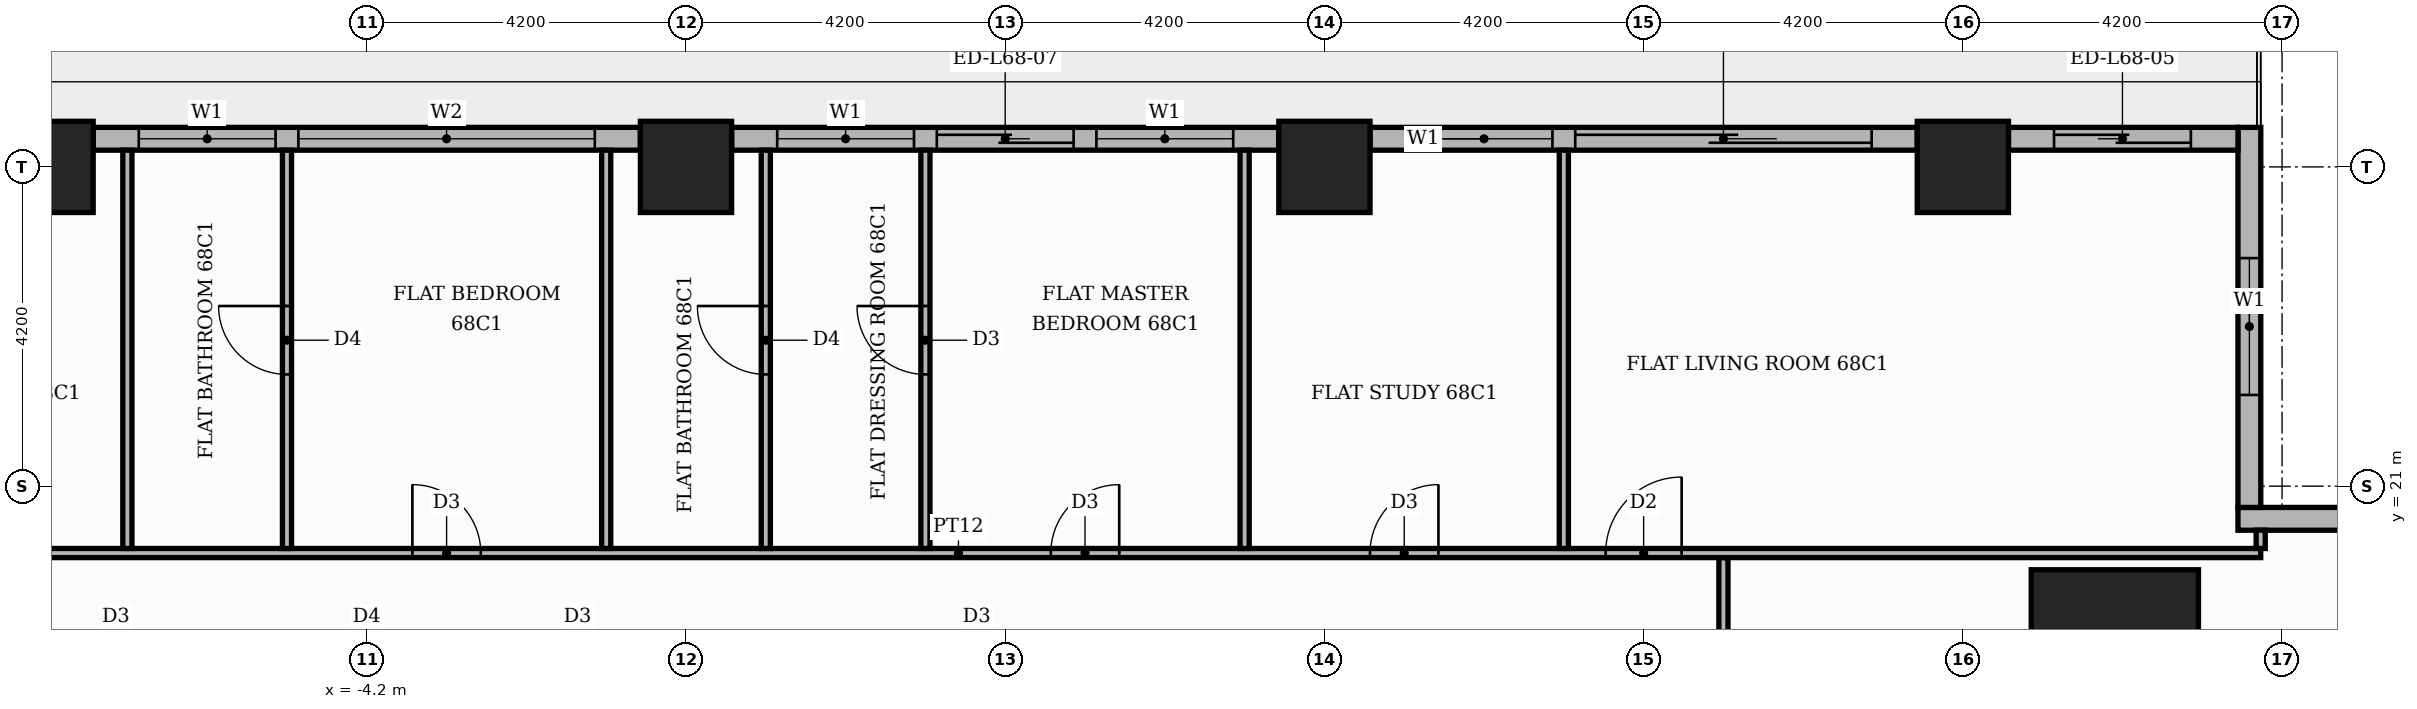
"""IFC4 building model, lengths in metres.
Left out: names, types, materials, properties, quantities, classifications, styles, units other than length and angle.
Written with IfcOpenShell. Run it as: python <this file> out.ifc"""

import sys

from ifc_helpers import new_model, si_unit, direction, frame, frame_2d, origin, origin_2d, place, context, subcontext, project, spatial, rectangle, extrude, element, fill, save


model = new_model("IFC4")
c1 = context("Model", 3, precision=1e-05, world=origin(), true_north=direction((0.0, 1.0)))
c2 = subcontext(c1, "Body", "Model", "MODEL_VIEW")
j1 = project(units=[si_unit("LENGTHUNIT", "METRE"), si_unit("PLANEANGLEUNIT", "RADIAN")], contexts=[c1])
p1 = place(None, origin())
s1 = spatial("IfcSite", under=j1, at=p1, CompositionType="ELEMENT")
p2 = place(p1, origin())
s2 = spatial("IfcBuilding", under=s1, at=p2, CompositionType="ELEMENT")
p3 = place(p2, frame((0.0, 0.0, 283.5)))
s3 = spatial("IfcBuildingStorey", under=s2, at=p3, CompositionType="ELEMENT", Elevation=283.5)
p4 = place(p3, frame((18.8, 18.8, 0.0), z_axis=(0.0, 0.0, 1.0), x_axis=(1.0, 0.0, 0.0)))
e1 = element("IfcColumn", 1, at=p4, inside=s3, PredefinedType="COLUMN", context=c2, shape_type="SweptSolid", body=[
    extrude(rectangle(XDim=2.2, YDim=2.2, at=origin_2d()), origin(), (0.0, 0.0, 1.0), 3.9),
])
for number, where, z_axis, x_axis in (
    (2, (0.0, 25.2, 0.0), (0.0, 0.0, 1.0), (1.0, 0.0, 0.0)),
    (3, (-8.4, 25.2, 0.0), (0.0, 0.0, 1.0), (1.0, 0.0, 0.0)),
    (4, (8.4, 25.2, 0.0), (0.0, 0.0, 1.0), (1.0, 0.0, 0.0)),
    (5, (16.8, 25.2, 0.0), (0.0, 0.0, 1.0), (1.0, 0.0, 0.0)),
):
    element("IfcColumn", number, at=place(p3, frame(where, z_axis=z_axis, x_axis=x_axis)), inside=s3, PredefinedType="COLUMN", context=c2, shape_type="SweptSolid", body=[
        extrude(rectangle(XDim=1.2, YDim=1.2, at=origin_2d()), origin(), (0.0, 0.0, 1.0), 3.9),
    ])
p5 = place(p3, frame((25.42, 20.57, 0.0), z_axis=(0.0, 0.0, 1.0), x_axis=(-1.0, 0.0, 0.0)))
e6 = element("IfcWall", 6, at=p5, inside=s3, PredefinedType="STANDARD", context=c2, shape_type="SweptSolid", body=[
    extrude(rectangle(XDim=5.0, YDim=0.3, at=frame_2d((2.5, 0.0))), origin(), (0.0, 0.0, 1.0), 3.4),
])
p6 = place(p5, frame((1.42, 0.0, 0.9)))
e7 = element("IfcOpeningElement", 7, at=p6, cuts=e6, PredefinedType="OPENING", context=c2, shape_type="SweptSolid", body=[
    extrude(rectangle(XDim=1.8, YDim=2.1, at=frame_2d((0.9, 1.05))), frame((0.0, 0.16, 0.0), z_axis=(0.0, -1.0, 0.0), x_axis=(1.0, 0.0, 0.0)), (0.0, 0.0, 1.0), 0.32),
])
p7 = place(p3, frame((20.57, 20.72, 0.0), z_axis=(0.0, 0.0, 1.0), x_axis=(0.0, 1.0, 0.0)))
e8 = element("IfcWall", 8, at=p7, inside=s3, PredefinedType="STANDARD", context=c2, shape_type="SweptSolid", body=[
    extrude(rectangle(XDim=5.0, YDim=0.3, at=frame_2d((2.5, 0.0))), origin(), (0.0, 0.0, 1.0), 3.4),
])
p8 = place(p7, frame((1.48, 0.0, 0.9)))
e9 = element("IfcOpeningElement", 9, at=p8, cuts=e8, PredefinedType="OPENING", context=c2, shape_type="SweptSolid", body=[
    extrude(rectangle(XDim=1.8, YDim=2.1, at=frame_2d((0.9, 1.05))), frame((0.0, 0.16, 0.0), z_axis=(0.0, -1.0, 0.0), x_axis=(1.0, 0.0, 0.0)), (0.0, 0.0, 1.0), 0.32),
])
p9 = place(p3, frame((20.42, 25.57, 0.0), z_axis=(0.0, 0.0, 1.0), x_axis=(-1.0, 0.0, 0.0)))
e10 = element("IfcWall", 10, at=p9, inside=s3, PredefinedType="STANDARD", context=c2, shape_type="SweptSolid", body=[
    extrude(rectangle(XDim=3.02, YDim=0.3, at=frame_2d((1.51, 0.0))), origin(), (0.0, 0.0, 1.0), 3.4),
])
p10 = place(p9, frame((0.62, 0.0, 0.0)))
e11 = element("IfcOpeningElement", 11, at=p10, cuts=e10, PredefinedType="OPENING", context=c2, shape_type="SweptSolid", body=[
    extrude(rectangle(XDim=1.8, YDim=2.4, at=frame_2d((0.9, 1.2))), frame((0.0, 0.16, 0.0), z_axis=(0.0, -1.0, 0.0), x_axis=(1.0, 0.0, 0.0)), (0.0, 0.0, 1.0), 0.32),
])
p11 = place(p3, frame((16.2, 25.57, 0.0), z_axis=(0.0, 0.0, 1.0), x_axis=(-1.0, 0.0, 0.0)))
e12 = element("IfcWall", 12, at=p11, inside=s3, PredefinedType="STANDARD", context=c2, shape_type="SweptSolid", body=[
    extrude(rectangle(XDim=7.2, YDim=0.3, at=frame_2d((3.6, 0.0))), origin(), (0.0, 0.0, 1.0), 3.4),
])
p12 = place(p11, frame((0.6, 0.0, 0.0)))
e13 = element("IfcOpeningElement", 13, at=p12, cuts=e12, PredefinedType="OPENING", context=c2, shape_type="SweptSolid", body=[
    extrude(rectangle(XDim=3.9, YDim=2.4, at=frame_2d((1.95, 1.2))), frame((0.0, 0.16, 0.0), z_axis=(0.0, -1.0, 0.0), x_axis=(1.0, 0.0, 0.0)), (0.0, 0.0, 1.0), 0.32),
])
p13 = place(p11, frame((4.8, 0.0, 0.9)))
e14 = element("IfcOpeningElement", 14, at=p13, cuts=e12, PredefinedType="OPENING", context=c2, shape_type="SweptSolid", body=[
    extrude(rectangle(XDim=1.8, YDim=2.1, at=frame_2d((0.9, 1.05))), frame((0.0, 0.16, 0.0), z_axis=(0.0, -1.0, 0.0), x_axis=(1.0, 0.0, 0.0)), (0.0, 0.0, 1.0), 0.32),
])
p14 = place(p3, frame((7.8, 25.57, 0.0), z_axis=(0.0, 0.0, 1.0), x_axis=(-1.0, 0.0, 0.0)))
e15 = element("IfcWall", 15, at=p14, inside=s3, PredefinedType="STANDARD", context=c2, shape_type="SweptSolid", body=[
    extrude(rectangle(XDim=7.2, YDim=0.3, at=frame_2d((3.6, 0.0))), origin(), (0.0, 0.0, 1.0), 3.4),
])
p15 = place(p14, frame((0.6, 0.0, 0.9)))
e16 = element("IfcOpeningElement", 16, at=p15, cuts=e15, PredefinedType="OPENING", context=c2, shape_type="SweptSolid", body=[
    extrude(rectangle(XDim=1.8, YDim=2.1, at=frame_2d((0.9, 1.05))), frame((0.0, 0.16, 0.0), z_axis=(0.0, -1.0, 0.0), x_axis=(1.0, 0.0, 0.0)), (0.0, 0.0, 1.0), 0.32),
])
p16 = place(p14, frame((2.7, 0.0, 0.0)))
e17 = element("IfcOpeningElement", 17, at=p16, cuts=e15, PredefinedType="OPENING", context=c2, shape_type="SweptSolid", body=[
    extrude(rectangle(XDim=1.8, YDim=2.4, at=frame_2d((0.9, 1.2))), frame((0.0, 0.16, 0.0), z_axis=(0.0, -1.0, 0.0), x_axis=(1.0, 0.0, 0.0)), (0.0, 0.0, 1.0), 0.32),
])
p17 = place(p14, frame((4.8, 0.0, 0.9)))
e18 = element("IfcOpeningElement", 18, at=p17, cuts=e15, PredefinedType="OPENING", context=c2, shape_type="SweptSolid", body=[
    extrude(rectangle(XDim=1.8, YDim=2.1, at=frame_2d((0.9, 1.05))), frame((0.0, 0.16, 0.0), z_axis=(0.0, -1.0, 0.0), x_axis=(1.0, 0.0, 0.0)), (0.0, 0.0, 1.0), 0.32),
])
p18 = place(p3, frame((-0.6, 25.57, 0.0), z_axis=(0.0, 0.0, 1.0), x_axis=(-1.0, 0.0, 0.0)))
e19 = element("IfcWall", 19, at=p18, inside=s3, PredefinedType="STANDARD", context=c2, shape_type="SweptSolid", body=[
    extrude(rectangle(XDim=7.2, YDim=0.3, at=frame_2d((3.6, 0.0))), origin(), (0.0, 0.0, 1.0), 3.4),
])
p19 = place(p18, frame((0.6, 0.0, 0.9)))
e20 = element("IfcOpeningElement", 20, at=p19, cuts=e19, PredefinedType="OPENING", context=c2, shape_type="SweptSolid", body=[
    extrude(rectangle(XDim=3.9, YDim=2.1, at=frame_2d((1.95, 1.05))), frame((0.0, 0.16, 0.0), z_axis=(0.0, -1.0, 0.0), x_axis=(1.0, 0.0, 0.0)), (0.0, 0.0, 1.0), 0.32),
])
p20 = place(p18, frame((4.8, 0.0, 0.9)))
e21 = element("IfcOpeningElement", 21, at=p20, cuts=e19, PredefinedType="OPENING", context=c2, shape_type="SweptSolid", body=[
    extrude(rectangle(XDim=1.8, YDim=2.1, at=frame_2d((0.9, 1.05))), frame((0.0, 0.16, 0.0), z_axis=(0.0, -1.0, 0.0), x_axis=(1.0, 0.0, 0.0)), (0.0, 0.0, 1.0), 0.32),
])
p21 = place(p3, frame((13.65, 13.75, 0.0), z_axis=(0.0, 0.0, 1.0), x_axis=(0.0, 1.0, 0.0)))
e22 = element("IfcWall", 22, at=p21, inside=s3, PredefinedType="PARTITIONING", context=c2, shape_type="SweptSolid", body=[
    extrude(rectangle(XDim=6.31, YDim=0.12, at=frame_2d((3.155, 0.0))), origin(), (0.0, 0.0, 1.0), 3.4),
])
p22 = place(p21, frame((2.685, 0.0, 0.0)))
e23 = element("IfcOpeningElement", 23, at=p22, cuts=e22, PredefinedType="OPENING", context=c2, shape_type="SweptSolid", body=[
    extrude(rectangle(XDim=0.9, YDim=2.1, at=frame_2d((0.45, 1.05))), frame((0.0, 0.07, 0.0), z_axis=(0.0, -1.0, 0.0), x_axis=(1.0, 0.0, 0.0)), (0.0, 0.0, 1.0), 0.14),
])
p23 = place(p3, frame((-13.55, 20.12, 0.0), z_axis=(0.0, 0.0, 1.0), x_axis=(1.0, 0.0, 0.0)))
e24 = element("IfcWall", 24, at=p23, inside=s3, PredefinedType="PARTITIONING", context=c2, shape_type="SweptSolid", body=[
    extrude(rectangle(XDim=34.269, YDim=0.12, at=frame_2d((17.135, 0.0))), origin(), (0.0, 0.0, 1.0), 3.4),
])
p24 = place(p23, frame((25.65, 0.0, 0.0)))
e25 = element("IfcOpeningElement", 25, at=p24, cuts=e24, PredefinedType="OPENING", context=c2, shape_type="SweptSolid", body=[
    extrude(rectangle(XDim=1.0, YDim=2.1, at=frame_2d((0.5, 1.05))), frame((0.0, 0.07, 0.0), z_axis=(0.0, -1.0, 0.0), x_axis=(1.0, 0.0, 0.0)), (0.0, 0.0, 1.0), 0.14),
])
p25 = place(p23, frame((22.55, 0.0, 0.0)))
e26 = element("IfcOpeningElement", 26, at=p25, cuts=e24, PredefinedType="OPENING", context=c2, shape_type="SweptSolid", body=[
    extrude(rectangle(XDim=0.9, YDim=2.1, at=frame_2d((0.45, 1.05))), frame((0.0, 0.07, 0.0), z_axis=(0.0, -1.0, 0.0), x_axis=(1.0, 0.0, 0.0)), (0.0, 0.0, 1.0), 0.14),
])
p26 = place(p23, frame((18.35, 0.0, 0.0)))
e27 = element("IfcOpeningElement", 27, at=p26, cuts=e24, PredefinedType="OPENING", context=c2, shape_type="SweptSolid", body=[
    extrude(rectangle(XDim=0.9, YDim=2.1, at=frame_2d((0.45, 1.05))), frame((0.0, 0.07, 0.0), z_axis=(0.0, -1.0, 0.0), x_axis=(1.0, 0.0, 0.0)), (0.0, 0.0, 1.0), 0.14),
])
p27 = place(p23, frame((9.95, 0.0, 0.0)))
e28 = element("IfcOpeningElement", 28, at=p27, cuts=e24, PredefinedType="OPENING", context=c2, shape_type="SweptSolid", body=[
    extrude(rectangle(XDim=0.9, YDim=2.1, at=frame_2d((0.45, 1.05))), frame((0.0, 0.07, 0.0), z_axis=(0.0, -1.0, 0.0), x_axis=(1.0, 0.0, 0.0)), (0.0, 0.0, 1.0), 0.14),
])
p28 = place(p23, frame((3.65, 0.0, 0.0)))
e29 = element("IfcOpeningElement", 29, at=p28, cuts=e24, PredefinedType="OPENING", context=c2, shape_type="SweptSolid", body=[
    extrude(rectangle(XDim=0.9, YDim=2.1, at=frame_2d((0.45, 1.05))), frame((0.0, 0.07, 0.0), z_axis=(0.0, -1.0, 0.0), x_axis=(1.0, 0.0, 0.0)), (0.0, 0.0, 1.0), 0.14),
])
p29 = place(p3, frame((-7.35, 20.18, 0.0), z_axis=(0.0, 0.0, 1.0), x_axis=(0.0, 1.0, 0.0)))
e30 = element("IfcWall", 30, at=p29, inside=s3, PredefinedType="PARTITIONING", context=c2, shape_type="SweptSolid", body=[
    extrude(rectangle(XDim=5.24, YDim=0.12, at=frame_2d((2.62, 0.0))), origin(), (0.0, 0.0, 1.0), 3.4),
])
p30 = place(p3, frame((-5.25, 20.18, 0.0), z_axis=(0.0, 0.0, 1.0), x_axis=(0.0, 1.0, 0.0)))
e31 = element("IfcWall", 31, at=p30, inside=s3, PredefinedType="PARTITIONING", context=c2, shape_type="SweptSolid", body=[
    extrude(rectangle(XDim=5.24, YDim=0.12, at=frame_2d((2.62, 0.0))), origin(), (0.0, 0.0, 1.0), 3.4),
])
p31 = place(p30, frame((2.29, 0.0, 0.0)))
e32 = element("IfcOpeningElement", 32, at=p31, cuts=e31, PredefinedType="OPENING", context=c2, shape_type="SweptSolid", body=[
    extrude(rectangle(XDim=0.9, YDim=2.1, at=frame_2d((0.45, 1.05))), frame((0.0, 0.07, 0.0), z_axis=(0.0, -1.0, 0.0), x_axis=(1.0, 0.0, 0.0)), (0.0, 0.0, 1.0), 0.14),
])
p32 = place(p3, frame((-1.05, 20.18, 0.0), z_axis=(0.0, 0.0, 1.0), x_axis=(0.0, 1.0, 0.0)))
e33 = element("IfcWall", 33, at=p32, inside=s3, PredefinedType="PARTITIONING", context=c2, shape_type="SweptSolid", body=[
    extrude(rectangle(XDim=5.24, YDim=0.12, at=frame_2d((2.62, 0.0))), origin(), (0.0, 0.0, 1.0), 3.4),
])
p33 = place(p3, frame((1.05, 20.18, 0.0), z_axis=(0.0, 0.0, 1.0), x_axis=(0.0, 1.0, 0.0)))
e34 = element("IfcWall", 34, at=p33, inside=s3, PredefinedType="PARTITIONING", context=c2, shape_type="SweptSolid", body=[
    extrude(rectangle(XDim=5.24, YDim=0.12, at=frame_2d((2.62, 0.0))), origin(), (0.0, 0.0, 1.0), 3.4),
])
p34 = place(p33, frame((2.29, 0.0, 0.0)))
e35 = element("IfcOpeningElement", 35, at=p34, cuts=e34, PredefinedType="OPENING", context=c2, shape_type="SweptSolid", body=[
    extrude(rectangle(XDim=0.9, YDim=2.1, at=frame_2d((0.45, 1.05))), frame((0.0, 0.07, 0.0), z_axis=(0.0, -1.0, 0.0), x_axis=(1.0, 0.0, 0.0)), (0.0, 0.0, 1.0), 0.14),
])
p35 = place(p3, frame((3.15, 20.18, 0.0), z_axis=(0.0, 0.0, 1.0), x_axis=(0.0, 1.0, 0.0)))
e36 = element("IfcWall", 36, at=p35, inside=s3, PredefinedType="PARTITIONING", context=c2, shape_type="SweptSolid", body=[
    extrude(rectangle(XDim=5.24, YDim=0.12, at=frame_2d((2.62, 0.0))), origin(), (0.0, 0.0, 1.0), 3.4),
])
p36 = place(p35, frame((2.29, 0.0, 0.0)))
e37 = element("IfcOpeningElement", 37, at=p36, cuts=e36, PredefinedType="OPENING", context=c2, shape_type="SweptSolid", body=[
    extrude(rectangle(XDim=0.9, YDim=2.1, at=frame_2d((0.45, 1.05))), frame((0.0, 0.07, 0.0), z_axis=(0.0, -1.0, 0.0), x_axis=(1.0, 0.0, 0.0)), (0.0, 0.0, 1.0), 0.14),
])
for number, where, z_axis, x_axis in (
    (38, (7.35, 20.18, 0.0), (0.0, 0.0, 1.0), (0.0, 1.0, 0.0)),
    (39, (11.55, 20.18, 0.0), (0.0, 0.0, 1.0), (0.0, 1.0, 0.0)),
):
    element("IfcWall", number, at=place(p3, frame(where, z_axis=z_axis, x_axis=x_axis)), inside=s3, PredefinedType="PARTITIONING", context=c2, shape_type="SweptSolid", body=[
        extrude(rectangle(XDim=5.24, YDim=0.12, at=frame_2d((2.62, 0.0))), origin(), (0.0, 0.0, 1.0), 3.4),
    ])
p37 = place(p3, frame((20.719, 20.18, 0.0), z_axis=(0.0, 0.0, 1.0), x_axis=(0.0, 1.0, 0.0)))
e40 = element("IfcWall", 40, at=p37, inside=s3, PredefinedType="PARTITIONING", context=c2, shape_type="SweptSolid", body=[
    extrude(rectangle(XDim=0.241, YDim=0.12, at=frame_2d((0.121, 0.0))), origin(), (0.0, 0.0, 1.0), 3.4),
])
p38 = place(p8, origin())
e41 = element("IfcWindow", 41, at=p38, inside=s3, PartitioningType="SINGLE_PANEL", PredefinedType="WINDOW", context=c2, shape_type="SweptSolid", body=[
    extrude(rectangle(XDim=1.8, YDim=2.1, at=frame_2d((0.9, 1.05))), frame((0.0, 0.03, 0.0), z_axis=(0.0, -1.0, 0.0), x_axis=(1.0, 0.0, 0.0)), (0.0, 0.0, 1.0), 0.06),
])
fill(e9, e41)
p39 = place(p10, origin())
e42 = element("IfcDoor", 42, at=p39, inside=s3, OperationType="SLIDING_TO_RIGHT", PredefinedType="DOOR", context=c2, shape_type="SweptSolid", body=[
    extrude(rectangle(XDim=1.8, YDim=2.4, at=frame_2d((0.9, 1.2))), frame((0.0, 0.025, 0.0), z_axis=(0.0, -1.0, 0.0), x_axis=(1.0, 0.0, 0.0)), (0.0, 0.0, 1.0), 0.05),
])
fill(e11, e42)
p40 = place(p12, origin())
e43 = element("IfcDoor", 43, at=p40, inside=s3, OperationType="SLIDING_TO_LEFT", PredefinedType="DOOR", context=c2, shape_type="SweptSolid", body=[
    extrude(rectangle(XDim=3.9, YDim=2.4, at=frame_2d((1.95, 1.2))), frame((0.0, 0.025, 0.0), z_axis=(0.0, -1.0, 0.0), x_axis=(1.0, 0.0, 0.0)), (0.0, 0.0, 1.0), 0.05),
])
fill(e13, e43)
p41 = place(p13, origin())
e44 = element("IfcWindow", 44, at=p41, inside=s3, PartitioningType="SINGLE_PANEL", PredefinedType="WINDOW", context=c2, shape_type="SweptSolid", body=[
    extrude(rectangle(XDim=1.8, YDim=2.1, at=frame_2d((0.9, 1.05))), frame((0.0, 0.03, 0.0), z_axis=(0.0, -1.0, 0.0), x_axis=(1.0, 0.0, 0.0)), (0.0, 0.0, 1.0), 0.06),
])
fill(e14, e44)
p42 = place(p15, origin())
e45 = element("IfcWindow", 45, at=p42, inside=s3, PartitioningType="SINGLE_PANEL", PredefinedType="WINDOW", context=c2, shape_type="SweptSolid", body=[
    extrude(rectangle(XDim=1.8, YDim=2.1, at=frame_2d((0.9, 1.05))), frame((0.0, 0.03, 0.0), z_axis=(0.0, -1.0, 0.0), x_axis=(1.0, 0.0, 0.0)), (0.0, 0.0, 1.0), 0.06),
])
fill(e16, e45)
p43 = place(p16, origin())
e46 = element("IfcDoor", 46, at=p43, inside=s3, OperationType="SLIDING_TO_LEFT", PredefinedType="DOOR", context=c2, shape_type="SweptSolid", body=[
    extrude(rectangle(XDim=1.8, YDim=2.4, at=frame_2d((0.9, 1.2))), frame((0.0, 0.025, 0.0), z_axis=(0.0, -1.0, 0.0), x_axis=(1.0, 0.0, 0.0)), (0.0, 0.0, 1.0), 0.05),
])
fill(e17, e46)
p44 = place(p17, origin())
e47 = element("IfcWindow", 47, at=p44, inside=s3, PartitioningType="SINGLE_PANEL", PredefinedType="WINDOW", context=c2, shape_type="SweptSolid", body=[
    extrude(rectangle(XDim=1.8, YDim=2.1, at=frame_2d((0.9, 1.05))), frame((0.0, 0.03, 0.0), z_axis=(0.0, -1.0, 0.0), x_axis=(1.0, 0.0, 0.0)), (0.0, 0.0, 1.0), 0.06),
])
fill(e18, e47)
p45 = place(p19, origin())
e48 = element("IfcWindow", 48, at=p45, inside=s3, PartitioningType="SINGLE_PANEL", PredefinedType="WINDOW", context=c2, shape_type="SweptSolid", body=[
    extrude(rectangle(XDim=3.9, YDim=2.1, at=frame_2d((1.95, 1.05))), frame((0.0, 0.03, 0.0), z_axis=(0.0, -1.0, 0.0), x_axis=(1.0, 0.0, 0.0)), (0.0, 0.0, 1.0), 0.06),
])
fill(e20, e48)
p46 = place(p20, origin())
e49 = element("IfcWindow", 49, at=p46, inside=s3, PartitioningType="SINGLE_PANEL", PredefinedType="WINDOW", context=c2, shape_type="SweptSolid", body=[
    extrude(rectangle(XDim=1.8, YDim=2.1, at=frame_2d((0.9, 1.05))), frame((0.0, 0.03, 0.0), z_axis=(0.0, -1.0, 0.0), x_axis=(1.0, 0.0, 0.0)), (0.0, 0.0, 1.0), 0.06),
])
fill(e21, e49)
p47 = place(p24, origin())
e50 = element("IfcDoor", 50, at=p47, inside=s3, OperationType="SINGLE_SWING_RIGHT", PredefinedType="DOOR", context=c2, shape_type="SweptSolid", body=[
    extrude(rectangle(XDim=1.0, YDim=2.1, at=frame_2d((0.5, 1.05))), frame((0.0, 0.025, 0.0), z_axis=(0.0, -1.0, 0.0), x_axis=(1.0, 0.0, 0.0)), (0.0, 0.0, 1.0), 0.05),
])
fill(e25, e50)
p48 = place(p25, origin())
e51 = element("IfcDoor", 51, at=p48, inside=s3, OperationType="SINGLE_SWING_RIGHT", PredefinedType="DOOR", context=c2, shape_type="SweptSolid", body=[
    extrude(rectangle(XDim=0.9, YDim=2.1, at=frame_2d((0.45, 1.05))), frame((0.0, 0.025, 0.0), z_axis=(0.0, -1.0, 0.0), x_axis=(1.0, 0.0, 0.0)), (0.0, 0.0, 1.0), 0.05),
])
fill(e26, e51)
p49 = place(p26, origin())
e52 = element("IfcDoor", 52, at=p49, inside=s3, OperationType="SINGLE_SWING_RIGHT", PredefinedType="DOOR", context=c2, shape_type="SweptSolid", body=[
    extrude(rectangle(XDim=0.9, YDim=2.1, at=frame_2d((0.45, 1.05))), frame((0.0, 0.025, 0.0), z_axis=(0.0, -1.0, 0.0), x_axis=(1.0, 0.0, 0.0)), (0.0, 0.0, 1.0), 0.05),
])
fill(e27, e52)
p50 = place(p36, origin())
e53 = element("IfcDoor", 53, at=p50, inside=s3, OperationType="SINGLE_SWING_RIGHT", PredefinedType="DOOR", context=c2, shape_type="SweptSolid", body=[
    extrude(rectangle(XDim=0.9, YDim=2.1, at=frame_2d((0.45, 1.05))), frame((0.0, 0.025, 0.0), z_axis=(0.0, -1.0, 0.0), x_axis=(1.0, 0.0, 0.0)), (0.0, 0.0, 1.0), 0.05),
])
fill(e37, e53)
p51 = place(p34, origin())
e54 = element("IfcDoor", 54, at=p51, inside=s3, OperationType="SINGLE_SWING_RIGHT", PredefinedType="DOOR", context=c2, shape_type="SweptSolid", body=[
    extrude(rectangle(XDim=0.9, YDim=2.1, at=frame_2d((0.45, 1.05))), frame((0.0, 0.025, 0.0), z_axis=(0.0, -1.0, 0.0), x_axis=(1.0, 0.0, 0.0)), (0.0, 0.0, 1.0), 0.05),
])
fill(e35, e54)
p52 = place(p27, origin())
e55 = element("IfcDoor", 55, at=p52, inside=s3, OperationType="SINGLE_SWING_LEFT", PredefinedType="DOOR", context=c2, shape_type="SweptSolid", body=[
    extrude(rectangle(XDim=0.9, YDim=2.1, at=frame_2d((0.45, 1.05))), frame((0.0, 0.025, 0.0), z_axis=(0.0, -1.0, 0.0), x_axis=(1.0, 0.0, 0.0)), (0.0, 0.0, 1.0), 0.05),
])
fill(e28, e55)
p53 = place(p31, origin())
e56 = element("IfcDoor", 56, at=p53, inside=s3, OperationType="SINGLE_SWING_RIGHT", PredefinedType="DOOR", context=c2, shape_type="SweptSolid", body=[
    extrude(rectangle(XDim=0.9, YDim=2.1, at=frame_2d((0.45, 1.05))), frame((0.0, 0.025, 0.0), z_axis=(0.0, -1.0, 0.0), x_axis=(1.0, 0.0, 0.0)), (0.0, 0.0, 1.0), 0.05),
])
fill(e32, e56)
save(model, sys.argv[1])
